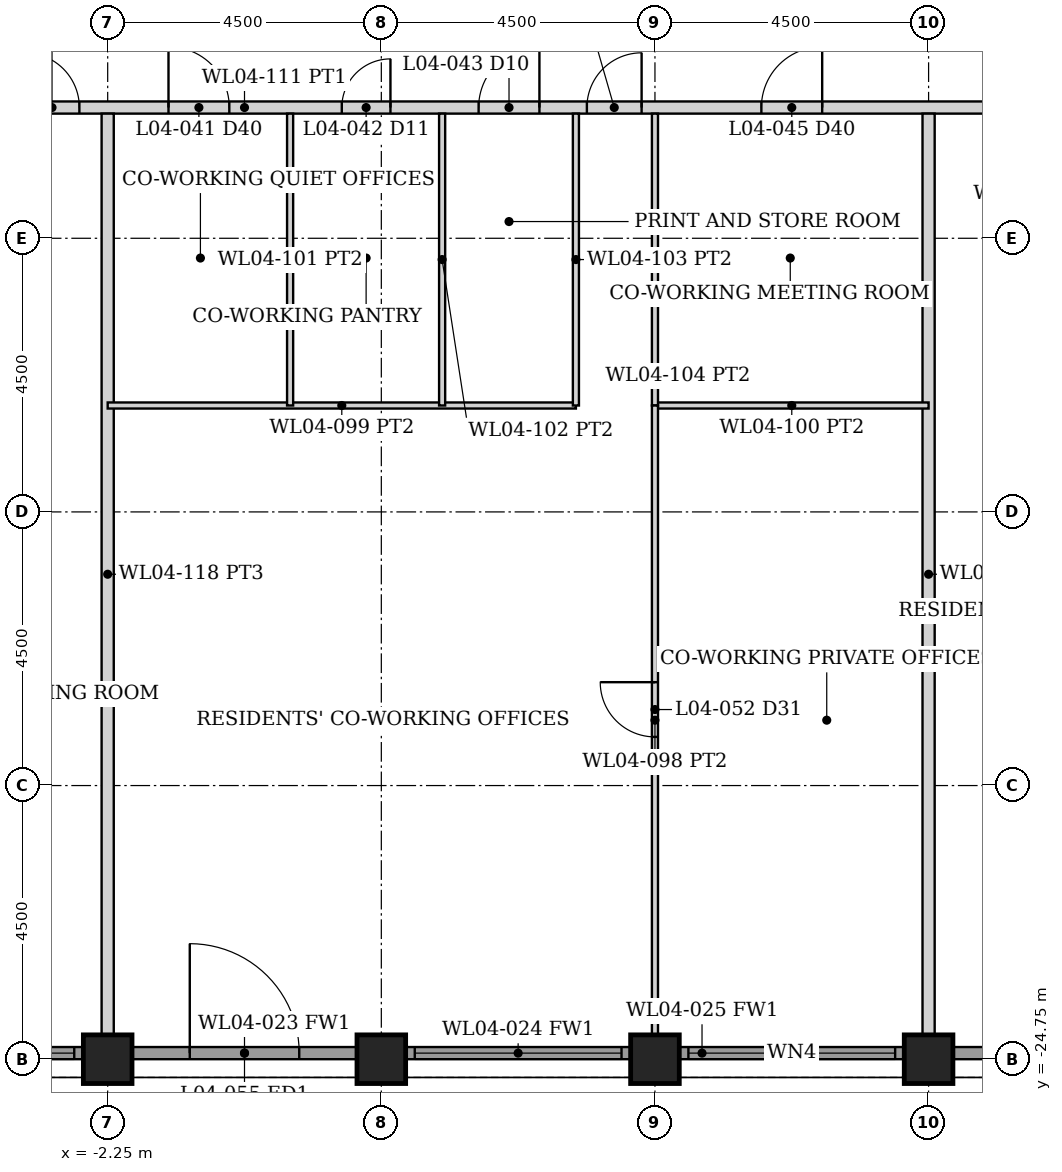
"""IFC4 building model, lengths in metres.
Left out: names, types, materials, properties, quantities, classifications, styles, units other than length and angle.
Written with IfcOpenShell. Run it as: python <this file> out.ifc"""

import sys

from ifc_helpers import new_model, si_unit, direction, frame, frame_2d, origin, origin_2d, place, context, subcontext, project, spatial, rectangle, hollow_rectangle, extrude, element, fill, save


model = new_model("IFC4")
c1 = context("Model", 3, precision=1e-05, world=origin(), true_north=direction((0.0, 1.0)))
c2 = subcontext(c1, "Body", "Model", "MODEL_VIEW")
j1 = project(units=[si_unit("LENGTHUNIT", "METRE"), si_unit("PLANEANGLEUNIT", "RADIAN")], contexts=[c1])
p1 = place(None, origin())
s1 = spatial("IfcSite", under=j1, at=p1, CompositionType="ELEMENT")
p2 = place(p1, origin())
s2 = spatial("IfcBuilding", under=s1, at=p2, CompositionType="ELEMENT")
p3 = place(p2, frame((0.0, 0.0, 21.5)))
s3 = spatial("IfcBuildingStorey", under=s2, at=p3, CompositionType="ELEMENT", Elevation=21.5)
for number, where, z_axis, x_axis in (
    (1, (-2.25, -24.75, 0.0), (0.0, 0.0, 1.0), (0.0, 1.0, 0.0)),
    (2, (2.25, -24.75, 0.0), (0.0, 0.0, 1.0), (0.0, 1.0, 0.0)),
    (3, (6.75, -24.75, 0.0), (0.0, 0.0, 1.0), (0.0, 1.0, 0.0)),
    (4, (11.25, -24.75, 0.0), (0.0, 0.0, 1.0), (0.0, 1.0, 0.0)),
):
    element("IfcColumn", number, at=place(p3, frame(where, z_axis=z_axis, x_axis=x_axis)), inside=s3, PredefinedType="COLUMN", context=c2, shape_type="SweptSolid", body=[
        extrude(hollow_rectangle(XDim=0.8, YDim=0.8, WallThickness=0.08, at=origin_2d()), origin(), (0.0, 0.0, 1.0), 5.0),
    ])
p4 = place(p3, frame((-6.345, -24.65, 0.0), z_axis=(0.0, 0.0, 1.0), x_axis=(1.0, 0.0, 0.0)))
e5 = element("IfcWall", 5, at=p4, inside=s3, PredefinedType="SOLIDWALL", context=c2, shape_type="SweptSolid", body=[
    extrude(rectangle(XDim=3.69, YDim=0.2, at=frame_2d((1.845, 0.0))), origin(), (0.0, 0.0, 1.0), 3.879),
])
p5 = place(p4, frame((0.145, 0.0, 0.3)))
e6 = element("IfcOpeningElement", 6, at=p5, cuts=e5, PredefinedType="OPENING", context=c2, shape_type="SweptSolid", body=[
    extrude(rectangle(XDim=3.4, YDim=3.429, at=frame_2d((1.7, 1.714))), frame((0.0, 0.11, 0.0), z_axis=(0.0, -1.0, 0.0), x_axis=(1.0, 0.0, 0.0)), (0.0, 0.0, 1.0), 0.22),
])
p6 = place(p3, frame((-1.845, -24.65, 0.0), z_axis=(0.0, 0.0, 1.0), x_axis=(1.0, 0.0, 0.0)))
e7 = element("IfcWall", 7, at=p6, inside=s3, PredefinedType="SOLIDWALL", context=c2, shape_type="SweptSolid", body=[
    extrude(rectangle(XDim=3.69, YDim=0.2, at=frame_2d((1.845, 0.0))), origin(), (0.0, 0.0, 1.0), 3.879),
])
p7 = place(p6, frame((0.945, 0.0, 0.0)))
e8 = element("IfcOpeningElement", 8, at=p7, cuts=e7, PredefinedType="OPENING", context=c2, shape_type="SweptSolid", body=[
    extrude(rectangle(XDim=1.8, YDim=2.4, at=frame_2d((0.9, 1.2))), frame((0.0, 0.11, 0.0), z_axis=(0.0, -1.0, 0.0), x_axis=(1.0, 0.0, 0.0)), (0.0, 0.0, 1.0), 0.22),
])
p8 = place(p3, frame((2.655, -24.65, 0.0), z_axis=(0.0, 0.0, 1.0), x_axis=(1.0, 0.0, 0.0)))
e9 = element("IfcWall", 9, at=p8, inside=s3, PredefinedType="SOLIDWALL", context=c2, shape_type="SweptSolid", body=[
    extrude(rectangle(XDim=3.69, YDim=0.2, at=frame_2d((1.845, 0.0))), origin(), (0.0, 0.0, 1.0), 3.879),
])
p9 = place(p8, frame((0.145, 0.0, 0.3)))
e10 = element("IfcOpeningElement", 10, at=p9, cuts=e9, PredefinedType="OPENING", context=c2, shape_type="SweptSolid", body=[
    extrude(rectangle(XDim=3.4, YDim=3.429, at=frame_2d((1.7, 1.714))), frame((0.0, 0.11, 0.0), z_axis=(0.0, -1.0, 0.0), x_axis=(1.0, 0.0, 0.0)), (0.0, 0.0, 1.0), 0.22),
])
p10 = place(p3, frame((7.155, -24.65, 0.0), z_axis=(0.0, 0.0, 1.0), x_axis=(1.0, 0.0, 0.0)))
e11 = element("IfcWall", 11, at=p10, inside=s3, PredefinedType="SOLIDWALL", context=c2, shape_type="SweptSolid", body=[
    extrude(rectangle(XDim=3.69, YDim=0.2, at=frame_2d((1.845, 0.0))), origin(), (0.0, 0.0, 1.0), 3.879),
])
p11 = place(p10, frame((0.145, 0.0, 0.3)))
e12 = element("IfcOpeningElement", 12, at=p11, cuts=e11, PredefinedType="OPENING", context=c2, shape_type="SweptSolid", body=[
    extrude(rectangle(XDim=3.4, YDim=3.429, at=frame_2d((1.7, 1.714))), frame((0.0, 0.11, 0.0), z_axis=(0.0, -1.0, 0.0), x_axis=(1.0, 0.0, 0.0)), (0.0, 0.0, 1.0), 0.22),
])
p12 = place(p3, frame((11.655, -24.65, 0.0), z_axis=(0.0, 0.0, 1.0), x_axis=(1.0, 0.0, 0.0)))
e13 = element("IfcWall", 13, at=p12, inside=s3, PredefinedType="SOLIDWALL", context=c2, shape_type="SweptSolid", body=[
    extrude(rectangle(XDim=3.69, YDim=0.2, at=frame_2d((1.845, 0.0))), origin(), (0.0, 0.0, 1.0), 3.879),
])
p13 = place(p12, frame((0.945, 0.0, 0.0)))
e14 = element("IfcOpeningElement", 14, at=p13, cuts=e13, PredefinedType="OPENING", context=c2, shape_type="SweptSolid", body=[
    extrude(rectangle(XDim=1.8, YDim=2.4, at=frame_2d((0.9, 1.2))), frame((0.0, 0.11, 0.0), z_axis=(0.0, -1.0, 0.0), x_axis=(1.0, 0.0, 0.0)), (0.0, 0.0, 1.0), 0.22),
])
p14 = place(p3, frame((-24.55, -9.1, 0.0), z_axis=(0.0, 0.0, 1.0), x_axis=(1.0, 0.0, 0.0)))
e15 = element("IfcWall", 15, at=p14, inside=s3, PredefinedType="PARTITIONING", context=c2, shape_type="SweptSolid", body=[
    extrude(rectangle(XDim=49.1, YDim=0.2, at=frame_2d((24.55, 0.0))), origin(), (0.0, 0.0, 1.0), 3.873),
])
p15 = place(p14, frame((6.452, 0.0, 0.0)))
e16 = element("IfcOpeningElement", 16, at=p15, cuts=e15, PredefinedType="OPENING", context=c2, shape_type="SweptSolid", body=[
    extrude(rectangle(XDim=0.9, YDim=2.1, at=frame_2d((0.45, 1.05))), frame((0.0, 0.11, 0.0), z_axis=(0.0, -1.0, 0.0), x_axis=(1.0, 0.0, 0.0)), (0.0, 0.0, 1.0), 0.22),
])
p16 = place(p14, frame((12.85, 0.0, 0.0)))
e17 = element("IfcOpeningElement", 17, at=p16, cuts=e15, PredefinedType="OPENING", context=c2, shape_type="SweptSolid", body=[
    extrude(rectangle(XDim=0.9, YDim=2.1, at=frame_2d((0.45, 1.05))), frame((0.0, 0.11, 0.0), z_axis=(0.0, -1.0, 0.0), x_axis=(1.0, 0.0, 0.0)), (0.0, 0.0, 1.0), 0.22),
])
p17 = place(p14, frame((20.934, 0.0, 0.0)))
e18 = element("IfcOpeningElement", 18, at=p17, cuts=e15, PredefinedType="OPENING", context=c2, shape_type="SweptSolid", body=[
    extrude(rectangle(XDim=0.9, YDim=2.1, at=frame_2d((0.45, 1.05))), frame((0.0, 0.11, 0.0), z_axis=(0.0, -1.0, 0.0), x_axis=(1.0, 0.0, 0.0)), (0.0, 0.0, 1.0), 0.22),
])
p18 = place(p14, frame((18.425, 0.0, 0.0)))
e19 = element("IfcOpeningElement", 19, at=p18, cuts=e15, PredefinedType="OPENING", context=c2, shape_type="SweptSolid", body=[
    extrude(rectangle(XDim=1.5, YDim=2.1, at=frame_2d((0.75, 1.05))), frame((0.0, 0.11, 0.0), z_axis=(0.0, -1.0, 0.0), x_axis=(1.0, 0.0, 0.0)), (0.0, 0.0, 1.0), 0.22),
])
p19 = place(p14, frame((30.18, 0.0, 0.0)))
e20 = element("IfcOpeningElement", 20, at=p19, cuts=e15, PredefinedType="OPENING", context=c2, shape_type="SweptSolid", body=[
    extrude(rectangle(XDim=0.9, YDim=2.1, at=frame_2d((0.45, 1.05))), frame((0.0, 0.11, 0.0), z_axis=(0.0, -1.0, 0.0), x_axis=(1.0, 0.0, 0.0)), (0.0, 0.0, 1.0), 0.22),
])
p20 = place(p14, frame((23.3, 0.0, 0.0)))
e21 = element("IfcOpeningElement", 21, at=p20, cuts=e15, PredefinedType="OPENING", context=c2, shape_type="SweptSolid", body=[
    extrude(rectangle(XDim=1.0, YDim=2.1, at=frame_2d((0.5, 1.05))), frame((0.0, 0.11, 0.0), z_axis=(0.0, -1.0, 0.0), x_axis=(1.0, 0.0, 0.0)), (0.0, 0.0, 1.0), 0.22),
])
p21 = place(p14, frame((26.15, 0.0, 0.0)))
e22 = element("IfcOpeningElement", 22, at=p21, cuts=e15, PredefinedType="OPENING", context=c2, shape_type="SweptSolid", body=[
    extrude(rectangle(XDim=0.8, YDim=2.1, at=frame_2d((0.4, 1.05))), frame((0.0, 0.11, 0.0), z_axis=(0.0, -1.0, 0.0), x_axis=(1.0, 0.0, 0.0)), (0.0, 0.0, 1.0), 0.22),
])
p22 = place(p14, frame((28.4, 0.0, 0.0)))
e23 = element("IfcOpeningElement", 23, at=p22, cuts=e15, PredefinedType="OPENING", context=c2, shape_type="SweptSolid", body=[
    extrude(rectangle(XDim=1.0, YDim=2.1, at=frame_2d((0.5, 1.05))), frame((0.0, 0.11, 0.0), z_axis=(0.0, -1.0, 0.0), x_axis=(1.0, 0.0, 0.0)), (0.0, 0.0, 1.0), 0.22),
])
p23 = place(p14, frame((33.05, 0.0, 0.0)))
e24 = element("IfcOpeningElement", 24, at=p23, cuts=e15, PredefinedType="OPENING", context=c2, shape_type="SweptSolid", body=[
    extrude(rectangle(XDim=1.0, YDim=2.1, at=frame_2d((0.5, 1.05))), frame((0.0, 0.11, 0.0), z_axis=(0.0, -1.0, 0.0), x_axis=(1.0, 0.0, 0.0)), (0.0, 0.0, 1.0), 0.22),
])
p24 = place(p14, frame((37.625, 0.0, 0.0)))
e25 = element("IfcOpeningElement", 25, at=p24, cuts=e15, PredefinedType="OPENING", context=c2, shape_type="SweptSolid", body=[
    extrude(rectangle(XDim=0.9, YDim=2.1, at=frame_2d((0.45, 1.05))), frame((0.0, 0.11, 0.0), z_axis=(0.0, -1.0, 0.0), x_axis=(1.0, 0.0, 0.0)), (0.0, 0.0, 1.0), 0.22),
])
p25 = place(p14, frame((40.8, 0.0, 0.0)))
e26 = element("IfcOpeningElement", 26, at=p25, cuts=e15, PredefinedType="OPENING", context=c2, shape_type="SweptSolid", body=[
    extrude(rectangle(XDim=1.0, YDim=2.1, at=frame_2d((0.5, 1.05))), frame((0.0, 0.11, 0.0), z_axis=(0.0, -1.0, 0.0), x_axis=(1.0, 0.0, 0.0)), (0.0, 0.0, 1.0), 0.22),
])
p26 = place(p14, frame((42.8, 0.0, 0.0)))
e27 = element("IfcOpeningElement", 27, at=p26, cuts=e15, PredefinedType="OPENING", context=c2, shape_type="SweptSolid", body=[
    extrude(rectangle(XDim=1.0, YDim=2.1, at=frame_2d((0.5, 1.05))), frame((0.0, 0.11, 0.0), z_axis=(0.0, -1.0, 0.0), x_axis=(1.0, 0.0, 0.0)), (0.0, 0.0, 1.0), 0.22),
])
for number, where, z_axis, x_axis in (
    (28, (-2.25, -24.35, 0.0), (0.0, 0.0, 1.0), (0.0, 1.0, 0.0)),
    (29, (11.25, -24.35, 0.0), (0.0, 0.0, 1.0), (0.0, 1.0, 0.0)),
):
    element("IfcWall", number, at=place(p3, frame(where, z_axis=z_axis, x_axis=x_axis)), inside=s3, PredefinedType="PARTITIONING", context=c2, shape_type="SweptSolid", body=[
        extrude(rectangle(XDim=15.15, YDim=0.2, at=frame_2d((7.575, 0.0))), origin(), (0.0, 0.0, 1.0), 3.873),
    ])
p27 = place(p3, frame((-2.25, -14.0, 0.0), z_axis=(0.0, 0.0, 1.0), x_axis=(1.0, 0.0, 0.0)))
e30 = element("IfcWall", 30, at=p27, inside=s3, PredefinedType="PARTITIONING", context=c2, shape_type="SweptSolid", body=[
    extrude(rectangle(XDim=7.7, YDim=0.1, at=frame_2d((3.85, 0.0))), origin(), (0.0, 0.0, 1.0), 3.873),
])
p28 = place(p3, frame((6.75, -14.0, 0.0), z_axis=(0.0, 0.0, 1.0), x_axis=(1.0, 0.0, 0.0)))
e31 = element("IfcWall", 31, at=p28, inside=s3, PredefinedType="PARTITIONING", context=c2, shape_type="SweptSolid", body=[
    extrude(rectangle(XDim=4.5, YDim=0.1, at=frame_2d((2.25, 0.0))), origin(), (0.0, 0.0, 1.0), 3.873),
])
for number, where, z_axis, x_axis in (
    (32, (0.75, -14.0, 0.0), (0.0, 0.0, 1.0), (0.0, 1.0, 0.0)),
    (33, (3.25, -14.0, 0.0), (0.0, 0.0, 1.0), (0.0, 1.0, 0.0)),
    (34, (5.45, -14.0, 0.0), (0.0, 0.0, 1.0), (0.0, 1.0, 0.0)),
    (35, (6.75, -14.0, 0.0), (0.0, 0.0, 1.0), (0.0, 1.0, 0.0)),
):
    element("IfcWall", number, at=place(p3, frame(where, z_axis=z_axis, x_axis=x_axis)), inside=s3, PredefinedType="PARTITIONING", context=c2, shape_type="SweptSolid", body=[
        extrude(rectangle(XDim=4.8, YDim=0.1, at=frame_2d((2.4, 0.0))), origin(), (0.0, 0.0, 1.0), 3.873),
    ])
p29 = place(p3, frame((6.75, -24.35, 0.0), z_axis=(0.0, 0.0, 1.0), x_axis=(0.0, 1.0, 0.0)))
e36 = element("IfcWall", 36, at=p29, inside=s3, PredefinedType="PARTITIONING", context=c2, shape_type="SweptSolid", body=[
    extrude(rectangle(XDim=10.35, YDim=0.1, at=frame_2d((5.175, 0.0))), origin(), (0.0, 0.0, 1.0), 3.873),
])
p30 = place(p29, frame((4.9, 0.0, 0.0)))
e37 = element("IfcOpeningElement", 37, at=p30, cuts=e36, PredefinedType="OPENING", context=c2, shape_type="SweptSolid", body=[
    extrude(rectangle(XDim=0.9, YDim=2.1, at=frame_2d((0.45, 1.05))), frame((0.0, 0.06, 0.0), z_axis=(0.0, -1.0, 0.0), x_axis=(1.0, 0.0, 0.0)), (0.0, 0.0, 1.0), 0.12),
])
p31 = place(p5, origin())
e38 = element("IfcWindow", 38, at=p31, inside=s3, PartitioningType="SINGLE_PANEL", PredefinedType="WINDOW", context=c2, shape_type="SweptSolid", body=[
    extrude(rectangle(XDim=3.4, YDim=3.429, at=frame_2d((1.7, 1.714))), frame((0.0, 0.03, 0.0), z_axis=(0.0, -1.0, 0.0), x_axis=(1.0, 0.0, 0.0)), (0.0, 0.0, 1.0), 0.06),
])
fill(e6, e38)
p32 = place(p7, origin())
e39 = element("IfcDoor", 39, at=p32, inside=s3, OperationType="DOUBLE_DOOR_SINGLE_SWING", PredefinedType="DOOR", context=c2, shape_type="SweptSolid", body=[
    extrude(rectangle(XDim=1.8, YDim=2.4, at=frame_2d((0.9, 1.2))), frame((0.0, 0.025, 0.0), z_axis=(0.0, -1.0, 0.0), x_axis=(1.0, 0.0, 0.0)), (0.0, 0.0, 1.0), 0.05),
])
fill(e8, e39)
p33 = place(p9, origin())
e40 = element("IfcWindow", 40, at=p33, inside=s3, PartitioningType="SINGLE_PANEL", PredefinedType="WINDOW", context=c2, shape_type="SweptSolid", body=[
    extrude(rectangle(XDim=3.4, YDim=3.429, at=frame_2d((1.7, 1.714))), frame((0.0, 0.03, 0.0), z_axis=(0.0, -1.0, 0.0), x_axis=(1.0, 0.0, 0.0)), (0.0, 0.0, 1.0), 0.06),
])
fill(e10, e40)
p34 = place(p11, origin())
e41 = element("IfcWindow", 41, at=p34, inside=s3, PartitioningType="SINGLE_PANEL", PredefinedType="WINDOW", context=c2, shape_type="SweptSolid", body=[
    extrude(rectangle(XDim=3.4, YDim=3.429, at=frame_2d((1.7, 1.714))), frame((0.0, 0.03, 0.0), z_axis=(0.0, -1.0, 0.0), x_axis=(1.0, 0.0, 0.0)), (0.0, 0.0, 1.0), 0.06),
])
fill(e12, e41)
p35 = place(p17, origin())
e42 = element("IfcDoor", 42, at=p35, inside=s3, OperationType="SINGLE_SWING_LEFT", PredefinedType="DOOR", context=c2, shape_type="SweptSolid", body=[
    extrude(rectangle(XDim=0.9, YDim=2.1, at=frame_2d((0.45, 1.05))), frame((0.0, 0.025, 0.0), z_axis=(0.0, -1.0, 0.0), x_axis=(1.0, 0.0, 0.0)), (0.0, 0.0, 1.0), 0.05),
])
fill(e18, e42)
p36 = place(p19, origin())
e43 = element("IfcDoor", 43, at=p36, inside=s3, OperationType="SINGLE_SWING_RIGHT", PredefinedType="DOOR", context=c2, shape_type="SweptSolid", body=[
    extrude(rectangle(XDim=0.9, YDim=2.1, at=frame_2d((0.45, 1.05))), frame((0.0, 0.025, 0.0), z_axis=(0.0, -1.0, 0.0), x_axis=(1.0, 0.0, 0.0)), (0.0, 0.0, 1.0), 0.05),
])
fill(e20, e43)
p37 = place(p20, origin())
e44 = element("IfcDoor", 44, at=p37, inside=s3, OperationType="SINGLE_SWING_LEFT", PredefinedType="DOOR", context=c2, shape_type="SweptSolid", body=[
    extrude(rectangle(XDim=1.0, YDim=2.1, at=frame_2d((0.5, 1.05))), frame((0.0, 0.025, 0.0), z_axis=(0.0, -1.0, 0.0), x_axis=(1.0, 0.0, 0.0)), (0.0, 0.0, 1.0), 0.05),
])
fill(e21, e44)
p38 = place(p21, origin())
e45 = element("IfcDoor", 45, at=p38, inside=s3, OperationType="SINGLE_SWING_RIGHT", PredefinedType="DOOR", context=c2, shape_type="SweptSolid", body=[
    extrude(rectangle(XDim=0.8, YDim=2.1, at=frame_2d((0.4, 1.05))), frame((0.0, 0.025, 0.0), z_axis=(0.0, -1.0, 0.0), x_axis=(1.0, 0.0, 0.0)), (0.0, 0.0, 1.0), 0.05),
])
fill(e22, e45)
p39 = place(p22, origin())
e46 = element("IfcDoor", 46, at=p39, inside=s3, OperationType="SINGLE_SWING_RIGHT", PredefinedType="DOOR", context=c2, shape_type="SweptSolid", body=[
    extrude(rectangle(XDim=1.0, YDim=2.1, at=frame_2d((0.5, 1.05))), frame((0.0, 0.025, 0.0), z_axis=(0.0, -1.0, 0.0), x_axis=(1.0, 0.0, 0.0)), (0.0, 0.0, 1.0), 0.05),
])
fill(e23, e46)
p40 = place(p23, origin())
e47 = element("IfcDoor", 47, at=p40, inside=s3, OperationType="SINGLE_SWING_RIGHT", PredefinedType="DOOR", context=c2, shape_type="SweptSolid", body=[
    extrude(rectangle(XDim=1.0, YDim=2.1, at=frame_2d((0.5, 1.05))), frame((0.0, 0.025, 0.0), z_axis=(0.0, -1.0, 0.0), x_axis=(1.0, 0.0, 0.0)), (0.0, 0.0, 1.0), 0.05),
])
fill(e24, e47)
p41 = place(p30, origin())
e48 = element("IfcDoor", 48, at=p41, inside=s3, OperationType="SINGLE_SWING_RIGHT", PredefinedType="DOOR", context=c2, shape_type="SweptSolid", body=[
    extrude(rectangle(XDim=0.9, YDim=2.1, at=frame_2d((0.45, 1.05))), frame((0.0, 0.025, 0.0), z_axis=(0.0, -1.0, 0.0), x_axis=(1.0, 0.0, 0.0)), (0.0, 0.0, 1.0), 0.05),
])
fill(e37, e48)
save(model, sys.argv[1])
